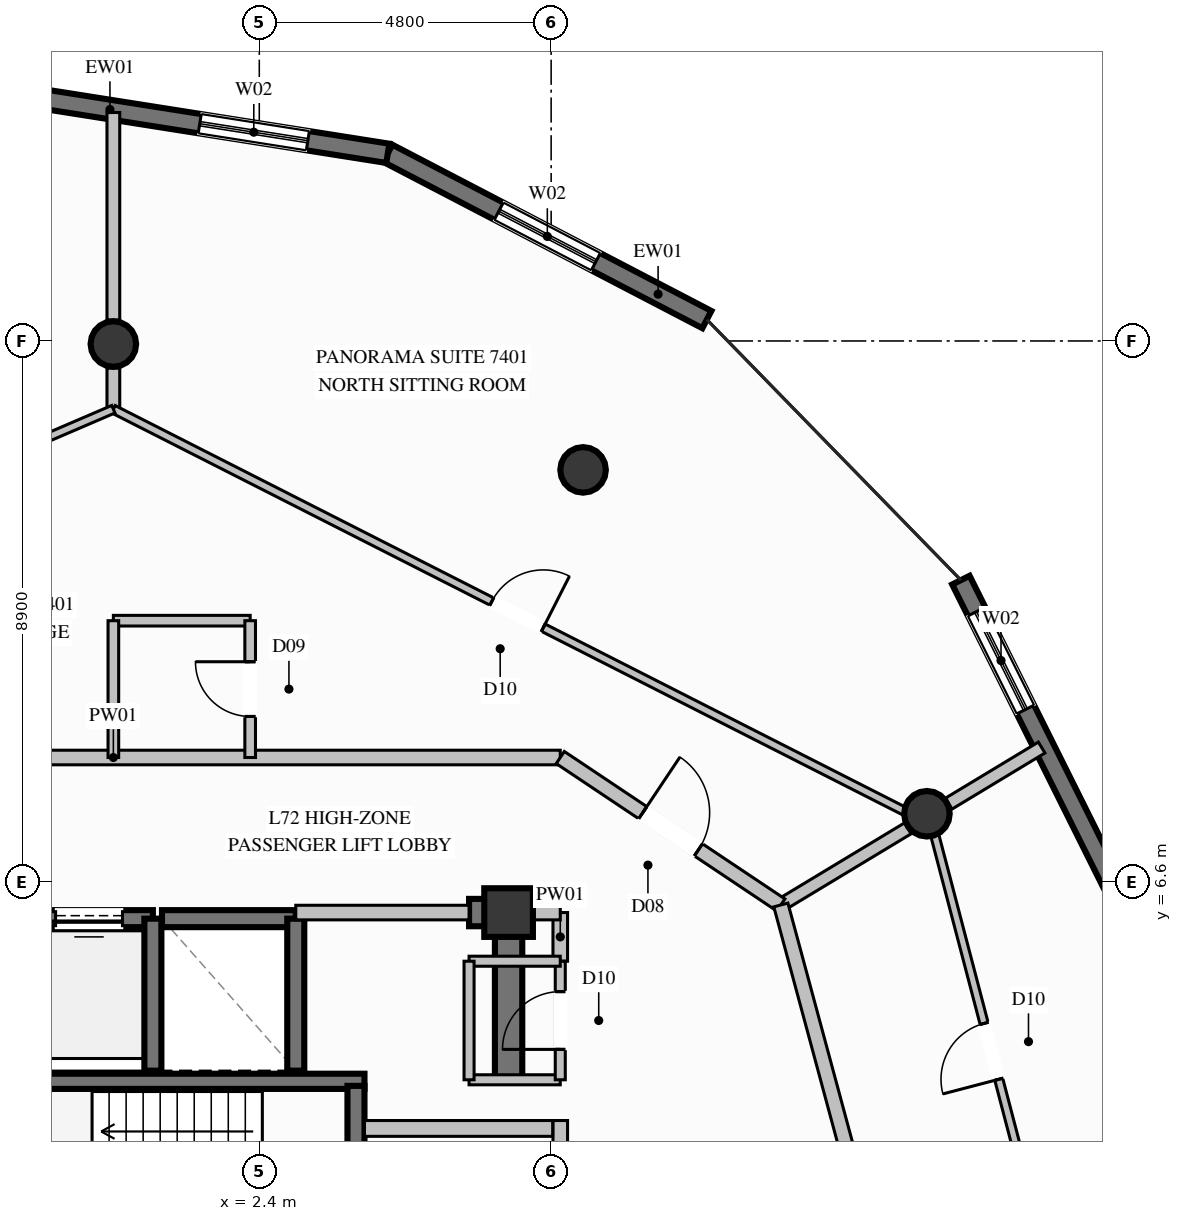
"""IFC4 building model, lengths in metres.
Left out: names, types, materials, properties, quantities, classifications, styles, units other than length and angle.
Written with IfcOpenShell. Run it as: python <this file> out.ifc"""

import sys

from ifc_helpers import new_model, si_unit, direction, frame, frame_2d, origin, origin_2d, place, context, subcontext, project, spatial, rectangle, circle, extrude, element, fill, save


model = new_model("IFC4")
c1 = context("Model", 3, precision=1e-05, world=origin(), true_north=direction((0.0, 1.0)))
c2 = subcontext(c1, "Body", "Model", "MODEL_VIEW")
j1 = project(units=[si_unit("LENGTHUNIT", "METRE"), si_unit("PLANEANGLEUNIT", "RADIAN")], contexts=[c1])
p1 = place(None, origin())
s1 = spatial("IfcSite", under=j1, at=p1, CompositionType="ELEMENT")
p2 = place(p1, origin())
s2 = spatial("IfcBuilding", under=s1, at=p2, CompositionType="ELEMENT")
p3 = place(p2, frame((0.0, 0.0, 278.2)))
s3 = spatial("IfcBuildingStorey", under=s2, at=p3, CompositionType="ELEMENT", Elevation=278.2)
p4 = place(p3, frame((6.5, 6.1, 0.0), z_axis=(0.0, 0.0, 1.0), x_axis=(1.0, 0.0, 0.0)))
e1 = element("IfcColumn", 1, at=p4, inside=s3, PredefinedType="COLUMN", context=c2, shape_type="SweptSolid", body=[
    extrude(rectangle(XDim=0.8, YDim=0.8, at=origin_2d()), origin(), (0.0, 0.0, 1.0), 3.8),
])
p5 = place(p3, frame((-4.13, 3.325, 0.0), z_axis=(0.0, 0.0, 1.0), x_axis=(1.0, 0.0, 0.0)))
e2 = element("IfcWall", 2, at=p5, inside=s3, PredefinedType="SOLIDWALL", context=c2, shape_type="SweptSolid", body=[
    extrude(rectangle(XDim=8.26, YDim=0.25, at=frame_2d((4.13, 0.0))), origin(), (0.0, 0.0, 1.0), 3.8),
])
p6 = place(p3, frame((5.85, 6.1, 0.0), z_axis=(0.0, 0.0, 1.0), x_axis=(1.0, 0.0, 0.0)))
e3 = element("IfcWall", 3, at=p6, inside=s3, PredefinedType="SHEAR", context=c2, shape_type="SweptSolid", body=[
    extrude(rectangle(XDim=0.425, YDim=0.45, at=frame_2d((0.212, 0.0))), origin(), (0.0, 0.0, 1.0), 3.8),
])
p7 = place(p3, frame((6.5, 3.35, 0.0), z_axis=(0.0, 0.0, 1.0), x_axis=(0.0, 1.0, 0.0)))
e4 = element("IfcWall", 4, at=p7, inside=s3, PredefinedType="SHEAR", context=c2, shape_type="SweptSolid", body=[
    extrude(rectangle(XDim=2.975, YDim=0.45, at=frame_2d((1.487, 0.0))), origin(), (0.0, 0.0, 1.0), 3.8),
])
for number, where, z_axis, x_axis in (
    (5, (13.38, 7.725, 0.0), (0.0, 0.0, 1.0), (1.0, 0.0, 0.0)),
    (6, (7.725, 13.38, 0.0), (0.0, 0.0, 1.0), (1.0, 0.0, 0.0)),
    (7, (0.0, 15.45, 0.0), (0.0, 0.0, 1.0), (1.0, 0.0, 0.0)),
):
    element("IfcColumn", number, at=place(p3, frame(where, z_axis=z_axis, x_axis=x_axis)), inside=s3, PredefinedType="COLUMN", context=c2, shape_type="SweptSolid", body=[
        extrude(circle(Radius=0.375, at=origin_2d()), origin(), (0.0, 0.0, 1.0), 3.8),
    ])
p8 = place(p3, frame((13.939, 11.567, 0.0), z_axis=(0.0, 0.0, 1.0), x_axis=(0.44621303713, -0.894926771024, 0.0)))
e8 = element("IfcWall", 8, at=p8, inside=s3, PredefinedType="SOLIDWALL", context=c2, shape_type="SweptSolid", body=[
    extrude(rectangle(XDim=6.053, YDim=0.32, at=frame_2d((3.026, 0.0))), origin(), (0.0, 0.0, 1.0), 3.57),
])
p9 = place(p8, frame((0.578, 0.0, 0.35)))
e9 = element("IfcOpeningElement", 9, at=p9, cuts=e8, PredefinedType="OPENING", context=c2, shape_type="SweptSolid", body=[
    extrude(rectangle(XDim=1.8, YDim=2.6, at=frame_2d((0.9, 1.3))), frame((0.0, 0.17, 0.0), z_axis=(0.0, -1.0, 0.0), x_axis=(1.0, 0.0, 0.0)), (0.0, 0.0, 1.0), 0.34),
])
p10 = place(p3, frame((4.514, 18.586, 0.0), z_axis=(0.0, 0.0, 1.0), x_axis=(0.886842224504, -0.462072363205, 0.0)))
e10 = element("IfcWall", 10, at=p10, inside=s3, PredefinedType="SOLIDWALL", context=c2, shape_type="SweptSolid", body=[
    extrude(rectangle(XDim=5.917, YDim=0.32, at=frame_2d((2.958, 0.0))), origin(), (0.0, 0.0, 1.0), 3.57),
])
p11 = place(p10, frame((2.058, 0.0, 0.35)))
e11 = element("IfcOpeningElement", 11, at=p11, cuts=e10, PredefinedType="OPENING", context=c2, shape_type="SweptSolid", body=[
    extrude(rectangle(XDim=1.8, YDim=2.6, at=frame_2d((0.9, 1.3))), frame((0.0, 0.17, 0.0), z_axis=(0.0, -1.0, 0.0), x_axis=(1.0, 0.0, 0.0)), (0.0, 0.0, 1.0), 0.34),
])
p12 = place(p3, frame((-1.286, 19.5, 0.0), z_axis=(0.0, 0.0, 1.0), x_axis=(0.987807428438, -0.155680712749, 0.0)))
e12 = element("IfcWall", 12, at=p12, inside=s3, PredefinedType="SOLIDWALL", context=c2, shape_type="SweptSolid", body=[
    extrude(rectangle(XDim=5.871, YDim=0.32, at=frame_2d((2.936, 0.0))), origin(), (0.0, 0.0, 1.0), 3.57),
])
p13 = place(p12, frame((2.74, 0.0, 0.35)))
e13 = element("IfcOpeningElement", 13, at=p13, cuts=e12, PredefinedType="OPENING", context=c2, shape_type="SweptSolid", body=[
    extrude(rectangle(XDim=1.8, YDim=2.6, at=frame_2d((0.9, 1.3))), frame((0.0, 0.17, 0.0), z_axis=(0.0, -1.0, 0.0), x_axis=(1.0, 0.0, 0.0)), (0.0, 0.0, 1.0), 0.34),
])
p14 = place(p3, frame((0.65, 6.0, 0.0), z_axis=(0.0, 0.0, 1.0), x_axis=(-1.0, 0.0, 0.0)))
e14 = element("IfcWall", 14, at=p14, inside=s3, PredefinedType="SOLIDWALL", context=c2, shape_type="SweptSolid", body=[
    extrude(rectangle(XDim=2.1, YDim=0.28, at=frame_2d((1.05, 0.0))), origin(), (0.0, 0.0, 1.0), 3.57),
])
p15 = place(p14, frame((0.5, 0.0, 0.0)))
e15 = element("IfcOpeningElement", 15, at=p15, cuts=e14, PredefinedType="OPENING", context=c2, shape_type="SweptSolid", body=[
    extrude(rectangle(XDim=1.1, YDim=2.2, at=frame_2d((0.55, 1.1))), frame((0.0, 0.15, 0.0), z_axis=(0.0, -1.0, 0.0), x_axis=(1.0, 0.0, 0.0)), (0.0, 0.0, 1.0), 0.3),
])
p16 = place(p3, frame((0.65, 3.5, 0.0), z_axis=(0.0, 0.0, 1.0), x_axis=(0.0, 1.0, 0.0)))
e16 = element("IfcWall", 16, at=p16, inside=s3, PredefinedType="SOLIDWALL", context=c2, shape_type="SweptSolid", body=[
    extrude(rectangle(XDim=2.5, YDim=0.28, at=frame_2d((1.25, 0.0))), origin(), (0.0, 0.0, 1.0), 3.57),
])
p17 = place(p3, frame((3.0, 6.0, 0.0), z_axis=(0.0, 0.0, 1.0), x_axis=(-1.0, 0.0, 0.0)))
e17 = element("IfcWall", 17, at=p17, inside=s3, PredefinedType="SOLIDWALL", context=c2, shape_type="SweptSolid", body=[
    extrude(rectangle(XDim=2.2, YDim=0.28, at=frame_2d((1.1, 0.0))), origin(), (0.0, 0.0, 1.0), 3.57),
])
p18 = place(p3, frame((3.0, 3.5, 0.0), z_axis=(0.0, 0.0, 1.0), x_axis=(0.0, 1.0, 0.0)))
e18 = element("IfcWall", 18, at=p18, inside=s3, PredefinedType="SOLIDWALL", context=c2, shape_type="SweptSolid", body=[
    extrude(rectangle(XDim=2.5, YDim=0.28, at=frame_2d((1.25, 0.0))), origin(), (0.0, 0.0, 1.0), 3.57),
])
p19 = place(p3, frame((3.99, -2.21, 0.0), z_axis=(0.0, 0.0, 1.0), x_axis=(0.0, 1.0, 0.0)))
e19 = element("IfcWall", 19, at=p19, inside=s3, PredefinedType="SOLIDWALL", context=c2, shape_type="SweptSolid", body=[
    extrude(rectangle(XDim=5.46, YDim=0.28, at=frame_2d((2.73, 0.0))), origin(), (0.0, 0.0, 1.0), 3.57),
])
p20 = place(p19, frame((3.323, 0.0, 0.0)))
e20 = element("IfcOpeningElement", 20, at=p20, cuts=e19, PredefinedType="OPENING", context=c2, shape_type="SweptSolid", body=[
    extrude(rectangle(XDim=1.2, YDim=2.2, at=frame_2d((0.6, 1.1))), frame((0.0, 0.15, 0.0), z_axis=(0.0, -1.0, 0.0), x_axis=(1.0, 0.0, 0.0)), (0.0, 0.0, 1.0), 0.3),
])
p21 = place(p3, frame((7.35, -2.34, 0.0), z_axis=(0.0, 0.0, 1.0), x_axis=(0.0, 1.0, 0.0)))
e21 = element("IfcWall", 21, at=p21, inside=s3, PredefinedType="PARTITIONING", context=c2, shape_type="SweptSolid", body=[
    extrude(rectangle(XDim=5.02, YDim=0.24, at=frame_2d((2.51, 0.0))), origin(), (0.0, 0.0, 1.0), 2.655),
])
p22 = place(p21, frame((2.515, 0.0, 0.0)))
e22 = element("IfcOpeningElement", 22, at=p22, cuts=e21, PredefinedType="OPENING", context=c2, shape_type="SweptSolid", body=[
    extrude(rectangle(XDim=1.15, YDim=2.2, at=frame_2d((0.575, 1.1))), frame((0.0, 0.13, 0.0), z_axis=(0.0, -1.0, 0.0), x_axis=(1.0, 0.0, 0.0)), (0.0, 0.0, 1.0), 0.26),
])
p23 = place(p3, frame((4.13, 2.55, 0.0), z_axis=(0.0, 0.0, 1.0), x_axis=(1.0, 0.0, 0.0)))
e23 = element("IfcWall", 23, at=p23, inside=s3, PredefinedType="PARTITIONING", context=c2, shape_type="SweptSolid", body=[
    extrude(rectangle(XDim=3.095, YDim=0.26, at=frame_2d((1.548, 0.0))), origin(), (0.0, 0.0, 1.0), 3.57),
])
p24 = place(p3, frame((-7.35, 8.65, 0.0), z_axis=(0.0, 0.0, 1.0), x_axis=(1.0, 0.0, 0.0)))
e24 = element("IfcWall", 24, at=p24, inside=s3, PredefinedType="PARTITIONING", context=c2, shape_type="SweptSolid", body=[
    extrude(rectangle(XDim=14.7, YDim=0.24, at=frame_2d((7.35, 0.0))), origin(), (0.0, 0.0, 1.0), 3.57),
])
p25 = place(p3, frame((3.0, 6.1, 0.0), z_axis=(0.0, 0.0, 1.0), x_axis=(1.0, 0.0, 0.0)))
e25 = element("IfcWall", 25, at=p25, inside=s3, PredefinedType="PARTITIONING", context=c2, shape_type="SweptSolid", body=[
    extrude(rectangle(XDim=2.85, YDim=0.24, at=frame_2d((1.425, 0.0))), origin(), (0.0, 0.0, 1.0), 2.655),
])
p26 = place(p3, frame((7.35, 5.3, 0.0), z_axis=(0.0, 0.0, 1.0), x_axis=(0.0, 1.0, 0.0)))
e26 = element("IfcWall", 26, at=p26, inside=s3, PredefinedType="PARTITIONING", context=c2, shape_type="SweptSolid", body=[
    extrude(rectangle(XDim=0.8, YDim=0.24, at=frame_2d((0.4, 0.0))), origin(), (0.0, 0.0, 1.0), 2.655),
])
p27 = place(p3, frame((6.5, 6.1, 0.0), z_axis=(0.0, 0.0, 1.0), x_axis=(1.0, 0.0, 0.0)))
e27 = element("IfcWall", 27, at=p27, inside=s3, PredefinedType="PARTITIONING", context=c2, shape_type="SweptSolid", body=[
    extrude(rectangle(XDim=0.85, YDim=0.24, at=frame_2d((0.425, 0.0))), origin(), (0.0, 0.0, 1.0), 3.011),
])
p28 = place(p3, frame((5.85, 3.35, 0.0), z_axis=(0.0, 0.0, 1.0), x_axis=(1.0, 0.0, 0.0)))
e28 = element("IfcWall", 28, at=p28, inside=s3, PredefinedType="PARTITIONING", context=c2, shape_type="SweptSolid", body=[
    extrude(rectangle(XDim=1.5, YDim=0.165, at=frame_2d((0.75, 0.0))), origin(), (0.0, 0.0, 1.0), 3.57),
])
p29 = place(p3, frame((7.35, 3.35, 0.0), z_axis=(0.0, 0.0, 1.0), x_axis=(0.0, 1.0, 0.0)))
e29 = element("IfcWall", 29, at=p29, inside=s3, PredefinedType="PARTITIONING", context=c2, shape_type="SweptSolid", body=[
    extrude(rectangle(XDim=1.95, YDim=0.165, at=frame_2d((0.975, 0.0))), origin(), (0.0, 0.0, 1.0), 3.57),
])
p30 = place(p29, frame((0.5, 0.0, 0.0)))
e30 = element("IfcOpeningElement", 30, at=p30, cuts=e29, PredefinedType="OPENING", context=c2, shape_type="SweptSolid", body=[
    extrude(rectangle(XDim=0.95, YDim=2.1, at=frame_2d((0.475, 1.05))), frame((0.0, 0.093, 0.0), z_axis=(0.0, -1.0, 0.0), x_axis=(1.0, 0.0, 0.0)), (0.0, 0.0, 1.0), 0.185),
])
p31 = place(p3, frame((7.35, 5.3, 0.0), z_axis=(0.0, 0.0, 1.0), x_axis=(-1.0, 0.0, 0.0)))
e31 = element("IfcWall", 31, at=p31, inside=s3, PredefinedType="PARTITIONING", context=c2, shape_type="SweptSolid", body=[
    extrude(rectangle(XDim=1.5, YDim=0.165, at=frame_2d((0.75, 0.0))), origin(), (0.0, 0.0, 1.0), 2.655),
])
p32 = place(p3, frame((5.85, 5.3, 0.0), z_axis=(0.0, 0.0, 1.0), x_axis=(0.0, -1.0, 0.0)))
e32 = element("IfcWall", 32, at=p32, inside=s3, PredefinedType="PARTITIONING", context=c2, shape_type="SweptSolid", body=[
    extrude(rectangle(XDim=1.95, YDim=0.165, at=frame_2d((0.975, 0.0))), origin(), (0.0, 0.0, 1.0), 2.655),
])
p33 = place(p3, frame((10.978, 6.225, 0.0), z_axis=(0.0, 0.0, 1.0), x_axis=(0.856173916647, 0.516687743664, 0.0)))
e33 = element("IfcWall", 33, at=p33, inside=s3, PredefinedType="PARTITIONING", context=c2, shape_type="SweptSolid", body=[
    extrude(rectangle(XDim=2.439, YDim=0.21, at=frame_2d((1.219, 0.0))), origin(), (0.0, 0.0, 1.0), 3.011),
])
p34 = place(p3, frame((13.738, 7.891, 0.0), z_axis=(0.0, 0.0, 1.0), x_axis=(0.856151167904, 0.516725437439, 0.0)))
e34 = element("IfcWall", 34, at=p34, inside=s3, PredefinedType="PARTITIONING", context=c2, shape_type="SweptSolid", body=[
    extrude(rectangle(XDim=1.786, YDim=0.21, at=frame_2d((0.893, 0.0))), origin(), (0.0, 0.0, 1.0), 3.57),
])
for number, where, z_axis, x_axis in (
    (35, (0.0, 10.9, 0.0), (0.0, 0.0, 1.0), (1.0, 0.0, 0.0)),
    (36, (0.0, 10.9, 0.0), (0.0, 0.0, 1.0), (0.0, -1.0, 0.0)),
):
    element("IfcWall", number, at=place(p3, frame(where, z_axis=z_axis, x_axis=x_axis)), inside=s3, PredefinedType="PLUMBINGWALL", context=c2, shape_type="SweptSolid", body=[
        extrude(rectangle(XDim=2.25, YDim=0.175, at=frame_2d((1.125, 0.0))), origin(), (0.0, 0.0, 1.0), 3.57),
    ])
p35 = place(p3, frame((2.25, 8.65, 0.0), z_axis=(0.0, 0.0, 1.0), x_axis=(0.0, 1.0, 0.0)))
e37 = element("IfcWall", 37, at=p35, inside=s3, PredefinedType="PLUMBINGWALL", context=c2, shape_type="SweptSolid", body=[
    extrude(rectangle(XDim=2.25, YDim=0.175, at=frame_2d((1.125, 0.0))), origin(), (0.0, 0.0, 1.0), 3.57),
])
p36 = place(p35, frame((0.675, 0.0, 0.0)))
e38 = element("IfcOpeningElement", 38, at=p36, cuts=e37, PredefinedType="OPENING", context=c2, shape_type="SweptSolid", body=[
    extrude(rectangle(XDim=0.9, YDim=2.1, at=frame_2d((0.45, 1.05))), frame((0.0, 0.098, 0.0), z_axis=(0.0, -1.0, 0.0), x_axis=(1.0, 0.0, 0.0)), (0.0, 0.0, 1.0), 0.195),
])
p37 = place(p3, frame((7.35, 8.65, 0.0), z_axis=(0.0, 0.0, 1.0), x_axis=(0.831395547998, -0.555681062094, 0.0)))
e39 = element("IfcWall", 39, at=p37, inside=s3, PredefinedType="PARTITIONING", context=c2, shape_type="SweptSolid", body=[
    extrude(rectangle(XDim=4.364, YDim=0.24, at=frame_2d((2.182, 0.0))), origin(), (0.0, 0.0, 1.0), 3.57),
])
p38 = place(p37, frame((1.632, 0.0, 0.0)))
e40 = element("IfcOpeningElement", 40, at=p38, cuts=e39, PredefinedType="OPENING", context=c2, shape_type="SweptSolid", body=[
    extrude(rectangle(XDim=1.1, YDim=2.3, at=frame_2d((0.55, 1.15))), frame((0.0, 0.13, 0.0), z_axis=(0.0, -1.0, 0.0), x_axis=(1.0, 0.0, 0.0)), (0.0, 0.0, 1.0), 0.26),
])
p39 = place(p3, frame((0.0, 14.378, 0.0), z_axis=(0.0, 0.0, 1.0), x_axis=(0.0, 1.0, 0.0)))
e41 = element("IfcWall", 41, at=p39, inside=s3, PredefinedType="PARTITIONING", context=c2, shape_type="SweptSolid", body=[
    extrude(rectangle(XDim=0.677, YDim=0.21, at=frame_2d((0.338, 0.0))), origin(), (0.0, 0.0, 1.0), 3.57),
])
p40 = place(p3, frame((0.0, 15.845, 0.0), z_axis=(0.0, 0.0, 1.0), x_axis=(0.0, 1.0, 0.0)))
e42 = element("IfcWall", 42, at=p40, inside=s3, PredefinedType="PARTITIONING", context=c2, shape_type="SweptSolid", body=[
    extrude(rectangle(XDim=3.412, YDim=0.21, at=frame_2d((1.706, 0.0))), origin(), (0.0, 0.0, 1.0), 3.57),
])
p41 = place(p3, frame((0.0, 14.378, 0.0), z_axis=(0.0, 0.0, 1.0), x_axis=(0.891513801847, -0.452993533195, 0.0)))
e43 = element("IfcWall", 43, at=p41, inside=s3, PredefinedType="PARTITIONING", context=c2, shape_type="SweptSolid", body=[
    extrude(rectangle(XDim=14.912, YDim=0.135, at=frame_2d((7.456, 0.0))), origin(), (0.0, 0.0, 1.0), 3.011),
])
p42 = place(p41, frame((6.981, 0.0, 0.0)))
e44 = element("IfcOpeningElement", 44, at=p42, cuts=e43, PredefinedType="OPENING", context=c2, shape_type="SweptSolid", body=[
    extrude(rectangle(XDim=0.95, YDim=2.1, at=frame_2d((0.475, 1.05))), frame((0.0, 0.078, 0.0), z_axis=(0.0, -1.0, 0.0), x_axis=(1.0, 0.0, 0.0)), (0.0, 0.0, 1.0), 0.155),
])
p43 = place(p3, frame((-14.408, 8.187, 0.0), z_axis=(0.0, 0.0, 1.0), x_axis=(0.918773394329, 0.394785321247, 0.0)))
e45 = element("IfcWall", 45, at=p43, inside=s3, PredefinedType="PARTITIONING", context=c2, shape_type="SweptSolid", body=[
    extrude(rectangle(XDim=15.682, YDim=0.135, at=frame_2d((7.841, 0.0))), origin(), (0.0, 0.0, 1.0), 3.57),
])
p44 = place(p43, frame((7.366, 0.0, 0.0)))
e46 = element("IfcOpeningElement", 46, at=p44, cuts=e45, PredefinedType="OPENING", context=c2, shape_type="SweptSolid", body=[
    extrude(rectangle(XDim=0.95, YDim=2.1, at=frame_2d((0.475, 1.05))), frame((0.0, 0.078, 0.0), z_axis=(0.0, -1.0, 0.0), x_axis=(1.0, 0.0, 0.0)), (0.0, 0.0, 1.0), 0.155),
])
p45 = place(p3, frame((12.7, -0.15, 0.0), z_axis=(0.0, 0.0, 1.0), x_axis=(-0.260760959349, 0.965403398626, 0.0)))
e47 = element("IfcWall", 47, at=p45, inside=s3, PredefinedType="PARTITIONING", context=c2, shape_type="SweptSolid", body=[
    extrude(rectangle(XDim=6.604, YDim=0.24, at=frame_2d((3.302, 0.0))), origin(), (0.0, 0.0, 1.0), 3.57),
])
p46 = place(p3, frame((15.459, -0.065, 0.0), z_axis=(0.0, 0.0, 1.0), x_axis=(-0.253589081107, 0.967312037526, 0.0)))
e48 = element("IfcWall", 48, at=p46, inside=s3, PredefinedType="PARTITIONING", context=c2, shape_type="SweptSolid", body=[
    extrude(rectangle(XDim=8.028, YDim=0.135, at=frame_2d((4.014, 0.0))), origin(), (0.0, 0.0, 1.0), 3.137),
])
p47 = place(p46, frame((3.539, 0.0, 0.0)))
e49 = element("IfcOpeningElement", 49, at=p47, cuts=e48, PredefinedType="OPENING", context=c2, shape_type="SweptSolid", body=[
    extrude(rectangle(XDim=0.95, YDim=2.1, at=frame_2d((0.475, 1.05))), frame((0.0, 0.078, 0.0), z_axis=(0.0, -1.0, 0.0), x_axis=(1.0, 0.0, 0.0)), (0.0, 0.0, 1.0), 0.155),
])
p48 = place(p9, origin())
e50 = element("IfcWindow", 50, at=p48, inside=s3, PartitioningType="SINGLE_PANEL", PredefinedType="WINDOW", context=c2, shape_type="SweptSolid", body=[
    extrude(rectangle(XDim=1.8, YDim=2.6, at=frame_2d((0.9, 1.3))), frame((0.0, 0.03, 0.0), z_axis=(0.0, -1.0, 0.0), x_axis=(1.0, 0.0, 0.0)), (0.0, 0.0, 1.0), 0.06),
])
fill(e9, e50)
p49 = place(p11, origin())
e51 = element("IfcWindow", 51, at=p49, inside=s3, PartitioningType="SINGLE_PANEL", PredefinedType="WINDOW", context=c2, shape_type="SweptSolid", body=[
    extrude(rectangle(XDim=1.8, YDim=2.6, at=frame_2d((0.9, 1.3))), frame((0.0, 0.03, 0.0), z_axis=(0.0, -1.0, 0.0), x_axis=(1.0, 0.0, 0.0)), (0.0, 0.0, 1.0), 0.06),
])
fill(e11, e51)
p50 = place(p13, origin())
e52 = element("IfcWindow", 52, at=p50, inside=s3, PartitioningType="SINGLE_PANEL", PredefinedType="WINDOW", context=c2, shape_type="SweptSolid", body=[
    extrude(rectangle(XDim=1.8, YDim=2.6, at=frame_2d((0.9, 1.3))), frame((0.0, 0.03, 0.0), z_axis=(0.0, -1.0, 0.0), x_axis=(1.0, 0.0, 0.0)), (0.0, 0.0, 1.0), 0.06),
])
fill(e13, e52)
p51 = place(p15, origin())
e53 = element("IfcDoor", 53, at=p51, inside=s3, OperationType="SLIDING_TO_LEFT", PredefinedType="DOOR", context=c2, shape_type="SweptSolid", body=[
    extrude(rectangle(XDim=1.1, YDim=2.2, at=frame_2d((0.55, 1.1))), frame((0.0, 0.025, 0.0), z_axis=(0.0, -1.0, 0.0), x_axis=(1.0, 0.0, 0.0)), (0.0, 0.0, 1.0), 0.05),
])
fill(e15, e53)
p52 = place(p30, origin())
e54 = element("IfcDoor", 54, at=p52, inside=s3, OperationType="SINGLE_SWING_LEFT", PredefinedType="DOOR", context=c2, shape_type="SweptSolid", body=[
    extrude(rectangle(XDim=0.95, YDim=2.1, at=frame_2d((0.475, 1.05))), frame((0.0, 0.025, 0.0), z_axis=(0.0, -1.0, 0.0), x_axis=(1.0, 0.0, 0.0)), (0.0, 0.0, 1.0), 0.05),
])
fill(e30, e54)
p53 = place(p36, origin())
e55 = element("IfcDoor", 55, at=p53, inside=s3, OperationType="SINGLE_SWING_RIGHT", PredefinedType="DOOR", context=c2, shape_type="SweptSolid", body=[
    extrude(rectangle(XDim=0.9, YDim=2.1, at=frame_2d((0.45, 1.05))), frame((0.0, 0.025, 0.0), z_axis=(0.0, -1.0, 0.0), x_axis=(1.0, 0.0, 0.0)), (0.0, 0.0, 1.0), 0.05),
])
fill(e38, e55)
p54 = place(p38, origin())
e56 = element("IfcDoor", 56, at=p54, inside=s3, OperationType="SINGLE_SWING_LEFT", PredefinedType="DOOR", context=c2, shape_type="SweptSolid", body=[
    extrude(rectangle(XDim=1.1, YDim=2.3, at=frame_2d((0.55, 1.15))), frame((0.0, 0.025, 0.0), z_axis=(0.0, -1.0, 0.0), x_axis=(1.0, 0.0, 0.0)), (0.0, 0.0, 1.0), 0.05),
])
fill(e40, e56)
p55 = place(p42, origin())
e57 = element("IfcDoor", 57, at=p55, inside=s3, OperationType="SINGLE_SWING_RIGHT", PredefinedType="DOOR", context=c2, shape_type="SweptSolid", body=[
    extrude(rectangle(XDim=0.95, YDim=2.1, at=frame_2d((0.475, 1.05))), frame((0.0, 0.025, 0.0), z_axis=(0.0, -1.0, 0.0), x_axis=(1.0, 0.0, 0.0)), (0.0, 0.0, 1.0), 0.05),
])
fill(e44, e57)
p56 = place(p47, origin())
e58 = element("IfcDoor", 58, at=p56, inside=s3, OperationType="SINGLE_SWING_LEFT", PredefinedType="DOOR", context=c2, shape_type="SweptSolid", body=[
    extrude(rectangle(XDim=0.95, YDim=2.1, at=frame_2d((0.475, 1.05))), frame((0.0, 0.025, 0.0), z_axis=(0.0, -1.0, 0.0), x_axis=(1.0, 0.0, 0.0)), (0.0, 0.0, 1.0), 0.05),
])
fill(e49, e58)
save(model, sys.argv[1])
